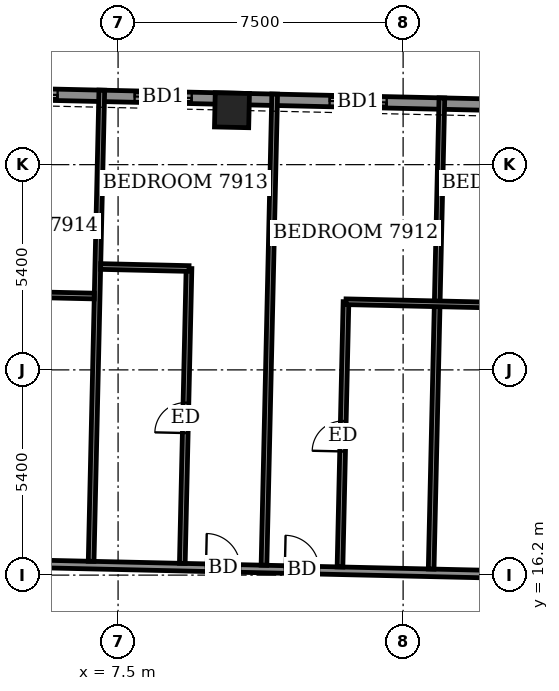
"""IFC4 building model, lengths in metres.
Left out: names, types, materials, properties, quantities, classifications, styles, units other than length and angle.
Written with IfcOpenShell. Run it as: python <this file> out.ifc"""

import sys

from ifc_helpers import new_model, si_unit, direction, frame, frame_2d, origin, origin_2d, place, context, subcontext, project, spatial, rectangle, extrude, element, fill, save


model = new_model("IFC4")
c1 = context("Model", 3, precision=1e-05, world=origin(), true_north=direction((0.0, 1.0)))
c2 = subcontext(c1, "Body", "Model", "MODEL_VIEW")
j1 = project(units=[si_unit("LENGTHUNIT", "METRE"), si_unit("PLANEANGLEUNIT", "RADIAN")], contexts=[c1])
p1 = place(None, origin())
s1 = spatial("IfcSite", under=j1, at=p1, CompositionType="ELEMENT")
p2 = place(p1, origin())
s2 = spatial("IfcBuilding", under=s1, at=p2, CompositionType="ELEMENT")
p3 = place(p2, frame((0.0, 0.0, 309.7)))
s3 = spatial("IfcBuildingStorey", under=s2, at=p3, CompositionType="ELEMENT", Elevation=309.7)
p4 = place(p3, frame((10.497, 28.432, -0.55), z_axis=(0.0, 0.0, 1.0), x_axis=(-0.999741662484, 0.022729018737, 0.0)))
e1 = element("IfcColumn", 1, at=p4, inside=s3, PredefinedType="COLUMN", context=c2, shape_type="SweptSolid", body=[
    extrude(rectangle(XDim=0.9, YDim=0.9, at=origin_2d()), origin(), (0.0, 0.0, 1.0), 3.6),
])
p5 = place(p3, frame((25.264, 28.397, 0.0), z_axis=(0.0, 0.0, 1.0), x_axis=(-0.999742391375, 0.022696935658, 0.0)))
e2 = element("IfcWall", 2, at=p5, inside=s3, PredefinedType="SOLIDWALL", context=c2, shape_type="SweptSolid", body=[
    extrude(rectangle(XDim=51.9, YDim=0.3, at=frame_2d((25.95, 0.0))), origin(), (0.0, 0.0, 1.0), 2.5),
])
p6 = place(p5, frame((1.898, 0.0, 0.0)))
e3 = element("IfcOpeningElement", 3, at=p6, cuts=e2, PredefinedType="OPENING", context=c2, shape_type="SweptSolid", body=[
    extrude(rectangle(XDim=1.5, YDim=2.4, at=frame_2d((0.75, 1.2))), frame((0.0, 0.16, 0.0), z_axis=(0.0, -1.0, 0.0), x_axis=(1.0, 0.0, 0.0)), (0.0, 0.0, 1.0), 0.32),
])
p7 = place(p5, frame((5.229, 0.0, 0.0)))
e4 = element("IfcOpeningElement", 4, at=p7, cuts=e2, PredefinedType="OPENING", context=c2, shape_type="SweptSolid", body=[
    extrude(rectangle(XDim=1.5, YDim=2.4, at=frame_2d((0.75, 1.2))), frame((0.0, 0.16, 0.0), z_axis=(0.0, -1.0, 0.0), x_axis=(1.0, 0.0, 0.0)), (0.0, 0.0, 1.0), 0.32),
])
p8 = place(p5, frame((10.7, 0.0, 0.0)))
e5 = element("IfcOpeningElement", 5, at=p8, cuts=e2, PredefinedType="OPENING", context=c2, shape_type="SweptSolid", body=[
    extrude(rectangle(XDim=1.5, YDim=2.4, at=frame_2d((0.75, 1.2))), frame((0.0, 0.16, 0.0), z_axis=(0.0, -1.0, 0.0), x_axis=(1.0, 0.0, 0.0)), (0.0, 0.0, 1.0), 0.32),
])
p9 = place(p5, frame((15.832, 0.0, 0.0)))
e6 = element("IfcOpeningElement", 6, at=p9, cuts=e2, PredefinedType="OPENING", context=c2, shape_type="SweptSolid", body=[
    extrude(rectangle(XDim=1.5, YDim=2.4, at=frame_2d((0.75, 1.2))), frame((0.0, 0.16, 0.0), z_axis=(0.0, -1.0, 0.0), x_axis=(1.0, 0.0, 0.0)), (0.0, 0.0, 1.0), 0.32),
])
p10 = place(p5, frame((19.361, 0.0, 0.0)))
e7 = element("IfcOpeningElement", 7, at=p10, cuts=e2, PredefinedType="OPENING", context=c2, shape_type="SweptSolid", body=[
    extrude(rectangle(XDim=1.5, YDim=2.4, at=frame_2d((0.75, 1.2))), frame((0.0, 0.16, 0.0), z_axis=(0.0, -1.0, 0.0), x_axis=(1.0, 0.0, 0.0)), (0.0, 0.0, 1.0), 0.32),
])
p11 = place(p5, frame((24.1, 0.0, 0.0)))
e8 = element("IfcOpeningElement", 8, at=p11, cuts=e2, PredefinedType="OPENING", context=c2, shape_type="SweptSolid", body=[
    extrude(rectangle(XDim=1.5, YDim=2.4, at=frame_2d((0.75, 1.2))), frame((0.0, 0.16, 0.0), z_axis=(0.0, -1.0, 0.0), x_axis=(1.0, 0.0, 0.0)), (0.0, 0.0, 1.0), 0.32),
])
p12 = place(p5, frame((27.539, 0.0, 0.0)))
e9 = element("IfcOpeningElement", 9, at=p12, cuts=e2, PredefinedType="OPENING", context=c2, shape_type="SweptSolid", body=[
    extrude(rectangle(XDim=1.5, YDim=2.4, at=frame_2d((0.75, 1.2))), frame((0.0, 0.16, 0.0), z_axis=(0.0, -1.0, 0.0), x_axis=(1.0, 0.0, 0.0)), (0.0, 0.0, 1.0), 0.32),
])
p13 = place(p5, frame((33.6, 0.0, 0.0)))
e10 = element("IfcOpeningElement", 10, at=p13, cuts=e2, PredefinedType="OPENING", context=c2, shape_type="SweptSolid", body=[
    extrude(rectangle(XDim=1.5, YDim=2.4, at=frame_2d((0.75, 1.2))), frame((0.0, 0.16, 0.0), z_axis=(0.0, -1.0, 0.0), x_axis=(1.0, 0.0, 0.0)), (0.0, 0.0, 1.0), 0.32),
])
p14 = place(p5, frame((38.643, 0.0, 0.0)))
e11 = element("IfcOpeningElement", 11, at=p14, cuts=e2, PredefinedType="OPENING", context=c2, shape_type="SweptSolid", body=[
    extrude(rectangle(XDim=1.5, YDim=2.4, at=frame_2d((0.75, 1.2))), frame((0.0, 0.16, 0.0), z_axis=(0.0, -1.0, 0.0), x_axis=(1.0, 0.0, 0.0)), (0.0, 0.0, 1.0), 0.32),
])
p15 = place(p5, frame((42.171, 0.0, 0.0)))
e12 = element("IfcOpeningElement", 12, at=p15, cuts=e2, PredefinedType="OPENING", context=c2, shape_type="SweptSolid", body=[
    extrude(rectangle(XDim=1.5, YDim=2.4, at=frame_2d((0.75, 1.2))), frame((0.0, 0.16, 0.0), z_axis=(0.0, -1.0, 0.0), x_axis=(1.0, 0.0, 0.0)), (0.0, 0.0, 1.0), 0.32),
])
p16 = place(p5, frame((47.637, 0.0, 0.9)))
e13 = element("IfcOpeningElement", 13, at=p16, cuts=e2, PredefinedType="OPENING", context=c2, shape_type="SweptSolid", body=[
    extrude(rectangle(XDim=2.4, YDim=1.5, at=frame_2d((1.2, 0.75))), frame((0.0, 0.16, 0.0), z_axis=(0.0, -1.0, 0.0), x_axis=(1.0, 0.0, 0.0)), (0.0, 0.0, 1.0), 0.32),
])
p17 = place(p3, frame((-30.652, 17.313, 0.0), z_axis=(0.0, 0.0, 1.0), x_axis=(0.999742623764, -0.02268669719, 0.0)))
e14 = element("IfcWall", 14, at=p17, inside=s3, PredefinedType="PARTITIONING", context=c2, shape_type="SweptSolid", body=[
    extrude(rectangle(XDim=58.8, YDim=0.2, at=frame_2d((29.4, 0.0))), origin(), (0.0, 0.0, 1.0), 3.05),
])
p18 = place(p17, frame((54.601, 0.0, 0.0)))
e15 = element("IfcOpeningElement", 15, at=p18, cuts=e14, PredefinedType="OPENING", context=c2, shape_type="SweptSolid", body=[
    extrude(rectangle(XDim=1.0, YDim=2.1, at=frame_2d((0.5, 1.05))), frame((0.0, 0.11, 0.0), z_axis=(0.0, -1.0, 0.0), x_axis=(1.0, 0.0, 0.0)), (0.0, 0.0, 1.0), 0.22),
])
p19 = place(p17, frame((49.35, 0.0, 0.0)))
e16 = element("IfcOpeningElement", 16, at=p19, cuts=e14, PredefinedType="OPENING", context=c2, shape_type="SweptSolid", body=[
    extrude(rectangle(XDim=0.9, YDim=2.1, at=frame_2d((0.45, 1.05))), frame((0.0, 0.11, 0.0), z_axis=(0.0, -1.0, 0.0), x_axis=(1.0, 0.0, 0.0)), (0.0, 0.0, 1.0), 0.22),
])
p20 = place(p17, frame((42.55, 0.0, 0.0)))
e17 = element("IfcOpeningElement", 17, at=p20, cuts=e14, PredefinedType="OPENING", context=c2, shape_type="SweptSolid", body=[
    extrude(rectangle(XDim=0.9, YDim=2.1, at=frame_2d((0.45, 1.05))), frame((0.0, 0.11, 0.0), z_axis=(0.0, -1.0, 0.0), x_axis=(1.0, 0.0, 0.0)), (0.0, 0.0, 1.0), 0.22),
])
p21 = place(p17, frame((40.475, 0.0, 0.0)))
e18 = element("IfcOpeningElement", 18, at=p21, cuts=e14, PredefinedType="OPENING", context=c2, shape_type="SweptSolid", body=[
    extrude(rectangle(XDim=0.9, YDim=2.1, at=frame_2d((0.45, 1.05))), frame((0.0, 0.11, 0.0), z_axis=(0.0, -1.0, 0.0), x_axis=(1.0, 0.0, 0.0)), (0.0, 0.0, 1.0), 0.22),
])
p22 = place(p17, frame((33.6, 0.0, 0.0)))
e19 = element("IfcOpeningElement", 19, at=p22, cuts=e14, PredefinedType="OPENING", context=c2, shape_type="SweptSolid", body=[
    extrude(rectangle(XDim=0.9, YDim=2.1, at=frame_2d((0.45, 1.05))), frame((0.0, 0.11, 0.0), z_axis=(0.0, -1.0, 0.0), x_axis=(1.0, 0.0, 0.0)), (0.0, 0.0, 1.0), 0.22),
])
p23 = place(p17, frame((31.55, 0.0, 0.0)))
e20 = element("IfcOpeningElement", 20, at=p23, cuts=e14, PredefinedType="OPENING", context=c2, shape_type="SweptSolid", body=[
    extrude(rectangle(XDim=0.9, YDim=2.1, at=frame_2d((0.45, 1.05))), frame((0.0, 0.11, 0.0), z_axis=(0.0, -1.0, 0.0), x_axis=(1.0, 0.0, 0.0)), (0.0, 0.0, 1.0), 0.22),
])
p24 = place(p17, frame((24.425, 0.0, 0.0)))
e21 = element("IfcOpeningElement", 21, at=p24, cuts=e14, PredefinedType="OPENING", context=c2, shape_type="SweptSolid", body=[
    extrude(rectangle(XDim=0.9, YDim=2.1, at=frame_2d((0.45, 1.05))), frame((0.0, 0.11, 0.0), z_axis=(0.0, -1.0, 0.0), x_axis=(1.0, 0.0, 0.0)), (0.0, 0.0, 1.0), 0.22),
])
p25 = place(p17, frame((22.05, 0.0, 0.0)))
e22 = element("IfcOpeningElement", 22, at=p25, cuts=e14, PredefinedType="OPENING", context=c2, shape_type="SweptSolid", body=[
    extrude(rectangle(XDim=0.9, YDim=2.1, at=frame_2d((0.45, 1.05))), frame((0.0, 0.11, 0.0), z_axis=(0.0, -1.0, 0.0), x_axis=(1.0, 0.0, 0.0)), (0.0, 0.0, 1.0), 0.22),
])
p26 = place(p17, frame((14.95, 0.0, 0.0)))
e23 = element("IfcOpeningElement", 23, at=p26, cuts=e14, PredefinedType="OPENING", context=c2, shape_type="SweptSolid", body=[
    extrude(rectangle(XDim=0.9, YDim=2.1, at=frame_2d((0.45, 1.05))), frame((0.0, 0.11, 0.0), z_axis=(0.0, -1.0, 0.0), x_axis=(1.0, 0.0, 0.0)), (0.0, 0.0, 1.0), 0.22),
])
p27 = place(p17, frame((12.525, 0.0, 0.0)))
e24 = element("IfcOpeningElement", 24, at=p27, cuts=e14, PredefinedType="OPENING", context=c2, shape_type="SweptSolid", body=[
    extrude(rectangle(XDim=0.9, YDim=2.1, at=frame_2d((0.45, 1.05))), frame((0.0, 0.11, 0.0), z_axis=(0.0, -1.0, 0.0), x_axis=(1.0, 0.0, 0.0)), (0.0, 0.0, 1.0), 0.22),
])
p28 = place(p17, frame((4.032, 0.0, 0.0)))
e25 = element("IfcOpeningElement", 25, at=p28, cuts=e14, PredefinedType="OPENING", context=c2, shape_type="SweptSolid", body=[
    extrude(rectangle(XDim=1.0, YDim=2.1, at=frame_2d((0.5, 1.05))), frame((0.0, 0.11, 0.0), z_axis=(0.0, -1.0, 0.0), x_axis=(1.0, 0.0, 0.0)), (0.0, 0.0, 1.0), 0.22),
])
p29 = place(p3, frame((6.791, 16.563, 0.0), z_axis=(0.0, 0.0, 1.0), x_axis=(0.022661475803, 0.999743195783, 0.0)))
e26 = element("IfcWall", 26, at=p29, inside=s3, PredefinedType="PARTITIONING", context=c2, shape_type="SweptSolid", body=[
    extrude(rectangle(XDim=12.4, YDim=0.15, at=frame_2d((6.2, 0.0))), origin(), (0.0, 0.0, 1.0), 2.5),
])
p30 = place(p3, frame((9.19, 16.509, 0.0), z_axis=(0.0, 0.0, 1.0), x_axis=(0.022683528451, 0.999742695666, 0.0)))
e27 = element("IfcWall", 27, at=p30, inside=s3, PredefinedType="PARTITIONING", context=c2, shape_type="SweptSolid", body=[
    extrude(rectangle(XDim=7.76, YDim=0.15, at=frame_2d((3.88, 0.0))), origin(), (0.0, 0.0, 1.0), 3.05),
])
p31 = place(p30, frame((3.43, 0.0, 0.0)))
e28 = element("IfcOpeningElement", 28, at=p31, cuts=e27, PredefinedType="OPENING", context=c2, shape_type="SweptSolid", body=[
    extrude(rectangle(XDim=0.8, YDim=2.1, at=frame_2d((0.4, 1.05))), frame((0.0, 0.085, 0.0), z_axis=(0.0, -1.0, 0.0), x_axis=(1.0, 0.0, 0.0)), (0.0, 0.0, 1.0), 0.17),
])
p32 = place(p3, frame((11.339, 16.46, 0.0), z_axis=(0.0, 0.0, 1.0), x_axis=(0.022740189192, 0.999741408463, 0.0)))
e29 = element("IfcWall", 29, at=p32, inside=s3, PredefinedType="PARTITIONING", context=c2, shape_type="SweptSolid", body=[
    extrude(rectangle(XDim=12.4, YDim=0.15, at=frame_2d((6.2, 0.0))), origin(), (0.0, 0.0, 1.0), 2.5),
])
p33 = place(p3, frame((13.339, 16.415, 0.0), z_axis=(0.0, 0.0, 1.0), x_axis=(0.022630826984, 0.999743890039, 0.0)))
e30 = element("IfcWall", 30, at=p33, inside=s3, PredefinedType="PARTITIONING", context=c2, shape_type="SweptSolid", body=[
    extrude(rectangle(XDim=6.98, YDim=0.15, at=frame_2d((3.49, 0.0))), origin(), (0.0, 0.0, 1.0), 3.05),
])
p34 = place(p33, frame((3.04, 0.0, 0.0)))
e31 = element("IfcOpeningElement", 31, at=p34, cuts=e30, PredefinedType="OPENING", context=c2, shape_type="SweptSolid", body=[
    extrude(rectangle(XDim=0.8, YDim=2.1, at=frame_2d((0.4, 1.05))), frame((0.0, 0.085, 0.0), z_axis=(0.0, -1.0, 0.0), x_axis=(1.0, 0.0, 0.0)), (0.0, 0.0, 1.0), 0.17),
])
p35 = place(p3, frame((15.738, 16.36, 0.0), z_axis=(0.0, 0.0, 1.0), x_axis=(0.022740189192, 0.999741408463, 0.0)))
e32 = element("IfcWall", 32, at=p35, inside=s3, PredefinedType="PARTITIONING", context=c2, shape_type="SweptSolid", body=[
    extrude(rectangle(XDim=12.4, YDim=0.15, at=frame_2d((6.2, 0.0))), origin(), (0.0, 0.0, 1.0), 2.5),
])
p36 = place(p3, frame((4.549, 23.596, 0.0), z_axis=(0.0, 0.0, 1.0), x_axis=(0.999740478815, -0.022781023197, 0.0)))
e33 = element("IfcWall", 33, at=p36, inside=s3, PredefinedType="PARTITIONING", context=c2, shape_type="SweptSolid", body=[
    extrude(rectangle(XDim=2.325, YDim=0.15, at=frame_2d((1.163, 0.0))), origin(), (0.0, 0.0, 1.0), 3.05),
])
p37 = place(p3, frame((13.497, 23.393, 0.0), z_axis=(0.0, 0.0, 1.0), x_axis=(0.999741520352, -0.022735269617, 0.0)))
e34 = element("IfcWall", 34, at=p37, inside=s3, PredefinedType="PARTITIONING", context=c2, shape_type="SweptSolid", body=[
    extrude(rectangle(XDim=4.8, YDim=0.15, at=frame_2d((2.4, 0.0))), origin(), (0.0, 0.0, 1.0), 3.05),
])
p38 = place(p3, frame((7.042, 24.32, 0.0), z_axis=(0.0, 0.0, 1.0), x_axis=(0.999740260747, -0.02279059109, 0.0)))
e35 = element("IfcWall", 35, at=p38, inside=s3, PredefinedType="PARTITIONING", context=c2, shape_type="SweptSolid", body=[
    extrude(rectangle(XDim=2.324, YDim=0.15, at=frame_2d((1.162, 0.0))), origin(), (0.0, 0.0, 1.0), 3.05),
])
p39 = place(p8, origin())
e36 = element("IfcDoor", 36, at=p39, inside=s3, OperationType="SLIDING_TO_LEFT", PredefinedType="DOOR", context=c2, shape_type="SweptSolid", body=[
    extrude(rectangle(XDim=1.5, YDim=2.4, at=frame_2d((0.75, 1.2))), frame((0.0, 0.025, 0.0), z_axis=(0.0, -1.0, 0.0), x_axis=(1.0, 0.0, 0.0)), (0.0, 0.0, 1.0), 0.05),
])
fill(e5, e36)
p40 = place(p9, origin())
e37 = element("IfcDoor", 37, at=p40, inside=s3, OperationType="SLIDING_TO_LEFT", PredefinedType="DOOR", context=c2, shape_type="SweptSolid", body=[
    extrude(rectangle(XDim=1.5, YDim=2.4, at=frame_2d((0.75, 1.2))), frame((0.0, 0.025, 0.0), z_axis=(0.0, -1.0, 0.0), x_axis=(1.0, 0.0, 0.0)), (0.0, 0.0, 1.0), 0.05),
])
fill(e6, e37)
p41 = place(p10, origin())
e38 = element("IfcDoor", 38, at=p41, inside=s3, OperationType="SLIDING_TO_LEFT", PredefinedType="DOOR", context=c2, shape_type="SweptSolid", body=[
    extrude(rectangle(XDim=1.5, YDim=2.4, at=frame_2d((0.75, 1.2))), frame((0.0, 0.025, 0.0), z_axis=(0.0, -1.0, 0.0), x_axis=(1.0, 0.0, 0.0)), (0.0, 0.0, 1.0), 0.05),
])
fill(e7, e38)
p42 = place(p20, origin())
e39 = element("IfcDoor", 39, at=p42, inside=s3, OperationType="SINGLE_SWING_RIGHT", PredefinedType="DOOR", context=c2, shape_type="SweptSolid", body=[
    extrude(rectangle(XDim=0.9, YDim=2.1, at=frame_2d((0.45, 1.05))), frame((0.0, 0.025, 0.0), z_axis=(0.0, -1.0, 0.0), x_axis=(1.0, 0.0, 0.0)), (0.0, 0.0, 1.0), 0.05),
])
fill(e17, e39)
p43 = place(p34, origin())
e40 = element("IfcDoor", 40, at=p43, inside=s3, OperationType="SINGLE_SWING_RIGHT", PredefinedType="DOOR", context=c2, shape_type="SweptSolid", body=[
    extrude(rectangle(XDim=0.8, YDim=2.1, at=frame_2d((0.4, 1.05))), frame((0.0, 0.025, 0.0), z_axis=(0.0, -1.0, 0.0), x_axis=(1.0, 0.0, 0.0)), (0.0, 0.0, 1.0), 0.05),
])
fill(e31, e40)
p44 = place(p21, origin())
e41 = element("IfcDoor", 41, at=p44, inside=s3, OperationType="SINGLE_SWING_LEFT", PredefinedType="DOOR", context=c2, shape_type="SweptSolid", body=[
    extrude(rectangle(XDim=0.9, YDim=2.1, at=frame_2d((0.45, 1.05))), frame((0.0, 0.025, 0.0), z_axis=(0.0, -1.0, 0.0), x_axis=(1.0, 0.0, 0.0)), (0.0, 0.0, 1.0), 0.05),
])
fill(e18, e41)
p45 = place(p31, origin())
e42 = element("IfcDoor", 42, at=p45, inside=s3, OperationType="SINGLE_SWING_LEFT", PredefinedType="DOOR", context=c2, shape_type="SweptSolid", body=[
    extrude(rectangle(XDim=0.8, YDim=2.1, at=frame_2d((0.4, 1.05))), frame((0.0, 0.025, 0.0), z_axis=(0.0, -1.0, 0.0), x_axis=(1.0, 0.0, 0.0)), (0.0, 0.0, 1.0), 0.05),
])
fill(e28, e42)
save(model, sys.argv[1])
